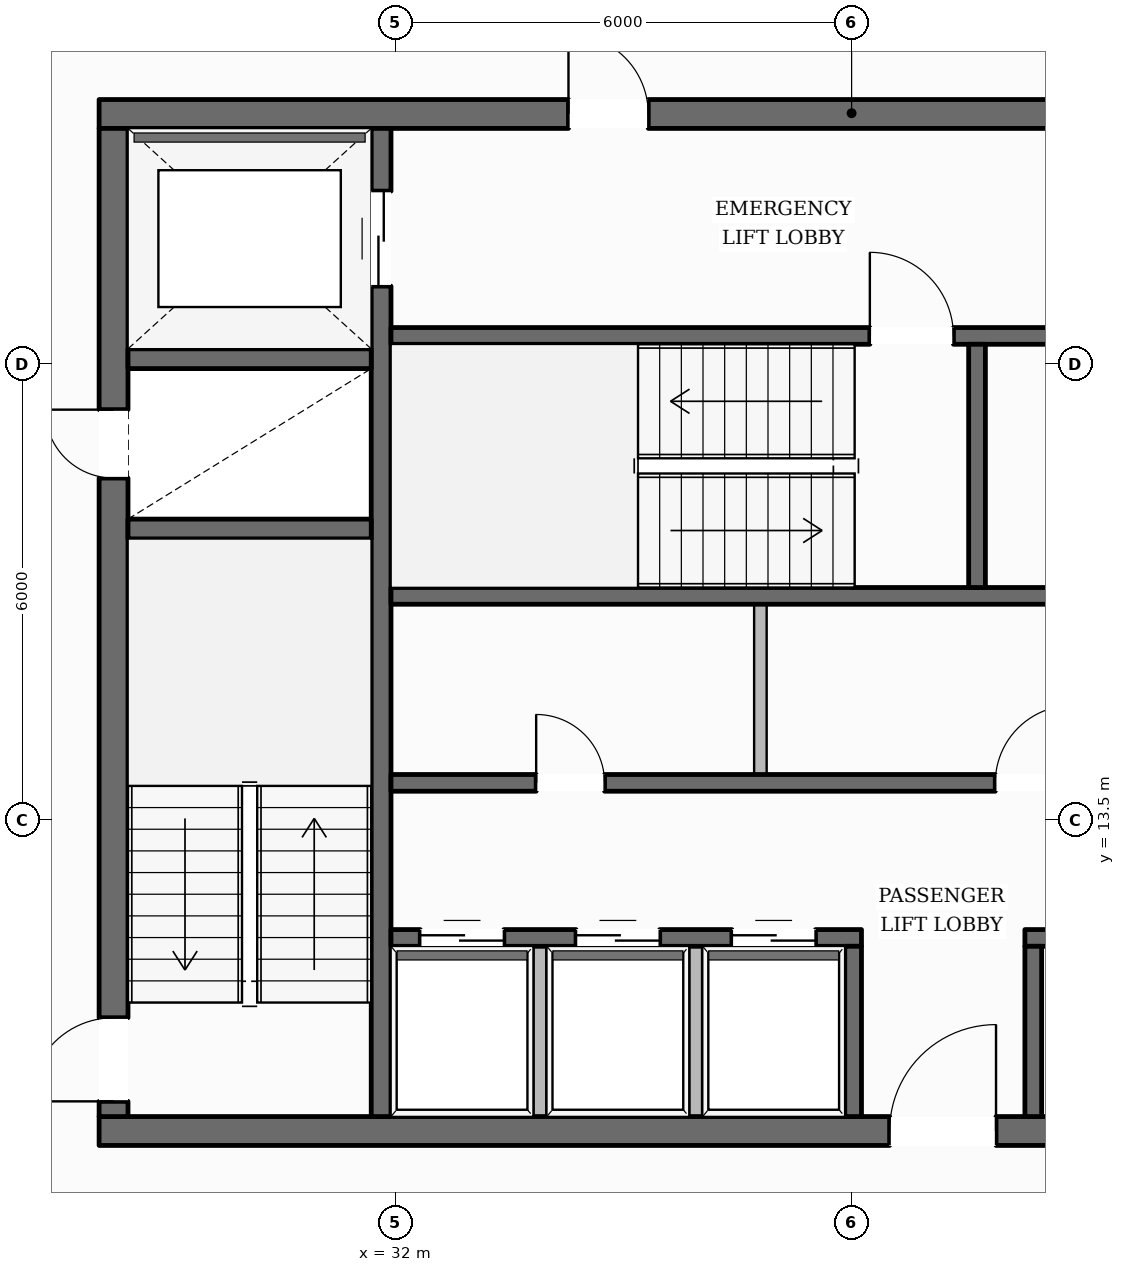
"""IFC4 building model, lengths in metres.
Left out: names, types, materials, properties, quantities, classifications, styles, units other than length and angle.
Written with IfcOpenShell. Run it as: python <this file> out.ifc"""

import sys

from ifc_helpers import new_model, si_unit, direction, frame, frame_2d, origin, place, context, subcontext, project, spatial, rectangle, extrude, element, fill, save


model = new_model("IFC4")
c1 = context("Model", 3, precision=1e-05, world=origin(), true_north=direction((0.0, 1.0)))
c2 = subcontext(c1, "Body", "Model", "MODEL_VIEW")
j1 = project(units=[si_unit("LENGTHUNIT", "METRE"), si_unit("PLANEANGLEUNIT", "RADIAN")], contexts=[c1])
p1 = place(None, origin())
s1 = spatial("IfcSite", under=j1, at=p1, CompositionType="ELEMENT")
p2 = place(p1, origin())
s2 = spatial("IfcBuilding", under=s1, at=p2, CompositionType="ELEMENT")
p3 = place(p2, frame((0.0, 0.0, 251.05)))
s3 = spatial("IfcBuildingStorey", under=s2, at=p3, CompositionType="ELEMENT", Elevation=251.05)
p4 = place(p3, frame((28.1, 9.41, 0.0), z_axis=(0.0, 0.0, 1.0), x_axis=(1.0, 0.0, 0.0)))
e1 = element("IfcWall", 1, at=p4, inside=s3, PredefinedType="SOLIDWALL", context=c2, shape_type="SweptSolid", body=[
    extrude(rectangle(XDim=19.8, YDim=0.38, at=frame_2d((9.9, 0.0))), origin(), (0.0, 0.0, 1.0), 3.61),
])
p5 = place(p4, frame((10.4, 0.0, 0.0)))
e2 = element("IfcOpeningElement", 2, at=p5, cuts=e1, PredefinedType="OPENING", context=c2, shape_type="SweptSolid", body=[
    extrude(rectangle(XDim=1.4, YDim=2.2, at=frame_2d((0.7, 1.1))), frame((0.0, 0.2, 0.0), z_axis=(0.0, -1.0, 0.0), x_axis=(1.0, 0.0, 0.0)), (0.0, 0.0, 1.0), 0.4),
])
p6 = place(p3, frame((28.1, 22.79, 0.0), z_axis=(0.0, 0.0, 1.0), x_axis=(1.0, 0.0, 0.0)))
e3 = element("IfcWall", 3, at=p6, inside=s3, PredefinedType="SOLIDWALL", context=c2, shape_type="SweptSolid", body=[
    extrude(rectangle(XDim=19.8, YDim=0.38, at=frame_2d((9.9, 0.0))), origin(), (0.0, 0.0, 1.0), 3.61),
])
p7 = place(p6, frame((6.175, 0.0, 0.0)))
e4 = element("IfcOpeningElement", 4, at=p7, cuts=e3, PredefinedType="OPENING", context=c2, shape_type="SweptSolid", body=[
    extrude(rectangle(XDim=1.05, YDim=2.15, at=frame_2d((0.525, 1.075))), frame((0.0, 0.2, 0.0), z_axis=(0.0, -1.0, 0.0), x_axis=(1.0, 0.0, 0.0)), (0.0, 0.0, 1.0), 0.4),
])
p8 = place(p6, frame((12.575, 0.0, 0.0)))
e5 = element("IfcOpeningElement", 5, at=p8, cuts=e3, PredefinedType="OPENING", context=c2, shape_type="SweptSolid", body=[
    extrude(rectangle(XDim=1.05, YDim=2.15, at=frame_2d((0.525, 1.075))), frame((0.0, 0.2, 0.0), z_axis=(0.0, -1.0, 0.0), x_axis=(1.0, 0.0, 0.0)), (0.0, 0.0, 1.0), 0.4),
])
p9 = place(p3, frame((28.29, 9.6, 0.0), z_axis=(0.0, 0.0, 1.0), x_axis=(0.0, 1.0, 0.0)))
e6 = element("IfcWall", 6, at=p9, inside=s3, PredefinedType="SOLIDWALL", context=c2, shape_type="SweptSolid", body=[
    extrude(rectangle(XDim=13.0, YDim=0.38, at=frame_2d((6.5, 0.0))), origin(), (0.0, 0.0, 1.0), 3.61),
])
p10 = place(p9, frame((0.2, 0.0, 0.0)))
e7 = element("IfcOpeningElement", 7, at=p10, cuts=e6, PredefinedType="OPENING", context=c2, shape_type="SweptSolid", body=[
    extrude(rectangle(XDim=1.1, YDim=2.15, at=frame_2d((0.55, 1.075))), frame((0.0, 0.2, 0.0), z_axis=(0.0, -1.0, 0.0), x_axis=(1.0, 0.0, 0.0)), (0.0, 0.0, 1.0), 0.4),
])
p11 = place(p9, frame((8.4, 0.0, 0.0)))
e8 = element("IfcOpeningElement", 8, at=p11, cuts=e6, PredefinedType="OPENING", context=c2, shape_type="SweptSolid", body=[
    extrude(rectangle(XDim=0.9, YDim=2.1, at=frame_2d((0.45, 1.05))), frame((0.0, 0.2, 0.0), z_axis=(0.0, -1.0, 0.0), x_axis=(1.0, 0.0, 0.0)), (0.0, 0.0, 1.0), 0.4),
])
p12 = place(p3, frame((31.81, 9.6, 0.0), z_axis=(0.0, 0.0, 1.0), x_axis=(0.0, 1.0, 0.0)))
e9 = element("IfcWall", 9, at=p12, inside=s3, PredefinedType="SHEAR", context=c2, shape_type="SweptSolid", body=[
    extrude(rectangle(XDim=13.0, YDim=0.26, at=frame_2d((6.5, 0.0))), origin(), (0.0, 0.0, 1.0), 3.61),
])
p13 = place(p12, frame((10.925, 0.0, 0.0)))
e10 = element("IfcOpeningElement", 10, at=p13, cuts=e9, PredefinedType="OPENING", context=c2, shape_type="SweptSolid", body=[
    extrude(rectangle(XDim=1.25, YDim=2.25, at=frame_2d((0.625, 1.125))), frame((0.0, 0.14, 0.0), z_axis=(0.0, -1.0, 0.0), x_axis=(1.0, 0.0, 0.0)), (0.0, 0.0, 1.0), 0.28),
])
for number, where, z_axis, x_axis in (
    (11, (28.48, 17.33, 0.0), (0.0, 0.0, 1.0), (1.0, 0.0, 0.0)),
    (12, (28.48, 19.57, 0.0), (0.0, 0.0, 1.0), (1.0, 0.0, 0.0)),
):
    element("IfcWall", number, at=place(p3, frame(where, z_axis=z_axis, x_axis=x_axis)), inside=s3, PredefinedType="SHEAR", context=c2, shape_type="SweptSolid", body=[
        extrude(rectangle(XDim=3.2, YDim=0.26, at=frame_2d((1.6, 0.0))), origin(), (0.0, 0.0, 1.0), 3.61),
    ])
p14 = place(p3, frame((31.94, 19.87, 0.0), z_axis=(0.0, 0.0, 1.0), x_axis=(1.0, 0.0, 0.0)))
e13 = element("IfcWall", 13, at=p14, inside=s3, PredefinedType="SOLIDWALL", context=c2, shape_type="SweptSolid", body=[
    extrude(rectangle(XDim=12.12, YDim=0.22, at=frame_2d((6.06, 0.0))), origin(), (0.0, 0.0, 1.0), 3.61),
])
p15 = place(p14, frame((6.3, 0.0, 0.0)))
e14 = element("IfcOpeningElement", 14, at=p15, cuts=e13, PredefinedType="OPENING", context=c2, shape_type="SweptSolid", body=[
    extrude(rectangle(XDim=1.1, YDim=2.15, at=frame_2d((0.55, 1.075))), frame((0.0, 0.12, 0.0), z_axis=(0.0, -1.0, 0.0), x_axis=(1.0, 0.0, 0.0)), (0.0, 0.0, 1.0), 0.24),
])
p16 = place(p14, frame((9.51, 0.0, 0.0)))
e15 = element("IfcOpeningElement", 15, at=p16, cuts=e13, PredefinedType="OPENING", context=c2, shape_type="SweptSolid", body=[
    extrude(rectangle(XDim=0.9, YDim=2.1, at=frame_2d((0.45, 1.05))), frame((0.0, 0.12, 0.0), z_axis=(0.0, -1.0, 0.0), x_axis=(1.0, 0.0, 0.0)), (0.0, 0.0, 1.0), 0.24),
])
p17 = place(p3, frame((31.94, 16.45, 0.0), z_axis=(0.0, 0.0, 1.0), x_axis=(1.0, 0.0, 0.0)))
e16 = element("IfcWall", 16, at=p17, inside=s3, PredefinedType="SOLIDWALL", context=c2, shape_type="SweptSolid", body=[
    extrude(rectangle(XDim=12.12, YDim=0.22, at=frame_2d((6.06, 0.0))), origin(), (0.0, 0.0, 1.0), 3.61),
])
p18 = place(p3, frame((39.65, 16.56, 0.0), z_axis=(0.0, 0.0, 1.0), x_axis=(0.0, 1.0, 0.0)))
e17 = element("IfcWall", 17, at=p18, inside=s3, PredefinedType="SOLIDWALL", context=c2, shape_type="SweptSolid", body=[
    extrude(rectangle(XDim=3.2, YDim=0.22, at=frame_2d((1.6, 0.0))), origin(), (0.0, 0.0, 1.0), 3.61),
])
p19 = place(p3, frame((31.94, 13.99, 0.0), z_axis=(0.0, 0.0, 1.0), x_axis=(1.0, 0.0, 0.0)))
e18 = element("IfcWall", 18, at=p19, inside=s3, PredefinedType="SOLIDWALL", context=c2, shape_type="SweptSolid", body=[
    extrude(rectangle(XDim=12.12, YDim=0.22, at=frame_2d((6.06, 0.0))), origin(), (0.0, 0.0, 1.0), 3.61),
])
p20 = place(p19, frame((1.91, 0.0, 0.0)))
e19 = element("IfcOpeningElement", 19, at=p20, cuts=e18, PredefinedType="OPENING", context=c2, shape_type="SweptSolid", body=[
    extrude(rectangle(XDim=0.9, YDim=2.1, at=frame_2d((0.45, 1.05))), frame((0.0, 0.12, 0.0), z_axis=(0.0, -1.0, 0.0), x_axis=(1.0, 0.0, 0.0)), (0.0, 0.0, 1.0), 0.24),
])
p21 = place(p19, frame((7.95, 0.0, 0.0)))
e20 = element("IfcOpeningElement", 20, at=p21, cuts=e18, PredefinedType="OPENING", context=c2, shape_type="SweptSolid", body=[
    extrude(rectangle(XDim=1.02, YDim=2.15, at=frame_2d((0.51, 1.075))), frame((0.0, 0.12, 0.0), z_axis=(0.0, -1.0, 0.0), x_axis=(1.0, 0.0, 0.0)), (0.0, 0.0, 1.0), 0.24),
])
p22 = place(p3, frame((31.94, 11.95, 0.0), z_axis=(0.0, 0.0, 1.0), x_axis=(1.0, 0.0, 0.0)))
e21 = element("IfcWall", 21, at=p22, inside=s3, PredefinedType="SOLIDWALL", context=c2, shape_type="SweptSolid", body=[
    extrude(rectangle(XDim=6.19, YDim=0.22, at=frame_2d((3.095, 0.0))), origin(), (0.0, 0.0, 1.0), 3.61),
])
p23 = place(p22, frame((0.385, 0.0, 0.0)))
e22 = element("IfcOpeningElement", 22, at=p23, cuts=e21, PredefinedType="OPENING", context=c2, shape_type="SweptSolid", body=[
    extrude(rectangle(XDim=1.1, YDim=2.2, at=frame_2d((0.55, 1.1))), frame((0.0, 0.12, 0.0), z_axis=(0.0, -1.0, 0.0), x_axis=(1.0, 0.0, 0.0)), (0.0, 0.0, 1.0), 0.24),
])
p24 = place(p22, frame((2.435, 0.0, 0.0)))
e23 = element("IfcOpeningElement", 23, at=p24, cuts=e21, PredefinedType="OPENING", context=c2, shape_type="SweptSolid", body=[
    extrude(rectangle(XDim=1.1, YDim=2.2, at=frame_2d((0.55, 1.1))), frame((0.0, 0.12, 0.0), z_axis=(0.0, -1.0, 0.0), x_axis=(1.0, 0.0, 0.0)), (0.0, 0.0, 1.0), 0.24),
])
p25 = place(p22, frame((4.485, 0.0, 0.0)))
e24 = element("IfcOpeningElement", 24, at=p25, cuts=e21, PredefinedType="OPENING", context=c2, shape_type="SweptSolid", body=[
    extrude(rectangle(XDim=1.1, YDim=2.2, at=frame_2d((0.55, 1.1))), frame((0.0, 0.12, 0.0), z_axis=(0.0, -1.0, 0.0), x_axis=(1.0, 0.0, 0.0)), (0.0, 0.0, 1.0), 0.24),
])
p26 = place(p3, frame((40.28, 11.95, 0.0), z_axis=(0.0, 0.0, 1.0), x_axis=(1.0, 0.0, 0.0)))
e25 = element("IfcWall", 25, at=p26, inside=s3, PredefinedType="SOLIDWALL", context=c2, shape_type="SweptSolid", body=[
    extrude(rectangle(XDim=3.78, YDim=0.22, at=frame_2d((1.89, 0.0))), origin(), (0.0, 0.0, 1.0), 3.61),
])
p27 = place(p26, frame((0.62, 0.0, 0.0)))
e26 = element("IfcOpeningElement", 26, at=p27, cuts=e25, PredefinedType="OPENING", context=c2, shape_type="SweptSolid", body=[
    extrude(rectangle(XDim=0.9, YDim=2.1, at=frame_2d((0.45, 1.05))), frame((0.0, 0.12, 0.0), z_axis=(0.0, -1.0, 0.0), x_axis=(1.0, 0.0, 0.0)), (0.0, 0.0, 1.0), 0.24),
])
p28 = place(p26, frame((2.47, 0.0, 0.0)))
e27 = element("IfcOpeningElement", 27, at=p28, cuts=e25, PredefinedType="OPENING", context=c2, shape_type="SweptSolid", body=[
    extrude(rectangle(XDim=0.9, YDim=2.1, at=frame_2d((0.45, 1.05))), frame((0.0, 0.12, 0.0), z_axis=(0.0, -1.0, 0.0), x_axis=(1.0, 0.0, 0.0)), (0.0, 0.0, 1.0), 0.24),
])
for number, where, z_axis, x_axis in (
    (28, (38.02, 9.6, 0.0), (0.0, 0.0, 1.0), (0.0, 1.0, 0.0)),
    (29, (40.39, 9.6, 0.0), (0.0, 0.0, 1.0), (0.0, 1.0, 0.0)),
):
    element("IfcWall", number, at=place(p3, frame(where, z_axis=z_axis, x_axis=x_axis)), inside=s3, PredefinedType="SOLIDWALL", context=c2, shape_type="SweptSolid", body=[
        extrude(rectangle(XDim=2.24, YDim=0.22, at=frame_2d((1.12, 0.0))), origin(), (0.0, 0.0, 1.0), 3.61),
    ])
p29 = place(p3, frame((16.214, 11.135, 0.0), z_axis=(0.0, 0.0, 1.0), x_axis=(0.49510347201, 0.868834018673, 0.0)))
e30 = element("IfcWall", 30, at=p29, inside=s3, PredefinedType="STANDARD", context=c2, shape_type="SweptSolid", body=[
    extrude(rectangle(XDim=37.643, YDim=0.35, at=frame_2d((18.822, 0.0))), origin(), (0.0, 0.0, 1.0), 3.196),
])
p30 = place(p29, frame((33.429, 0.0, 0.65)))
e31 = element("IfcOpeningElement", 31, at=p30, cuts=e30, PredefinedType="OPENING", context=c2, shape_type="SweptSolid", body=[
    extrude(rectangle(XDim=1.35, YDim=1.75, at=frame_2d((0.675, 0.875))), frame((0.0, 0.185, 0.0), z_axis=(0.0, -1.0, 0.0), x_axis=(1.0, 0.0, 0.0)), (0.0, 0.0, 1.0), 0.37),
])
p31 = place(p29, frame((27.315, 0.0, 0.65)))
e32 = element("IfcOpeningElement", 32, at=p31, cuts=e30, PredefinedType="OPENING", context=c2, shape_type="SweptSolid", body=[
    extrude(rectangle(XDim=1.35, YDim=1.75, at=frame_2d((0.675, 0.875))), frame((0.0, 0.185, 0.0), z_axis=(0.0, -1.0, 0.0), x_axis=(1.0, 0.0, 0.0)), (0.0, 0.0, 1.0), 0.37),
])
p32 = place(p29, frame((15.087, 0.0, 0.65)))
e33 = element("IfcOpeningElement", 33, at=p32, cuts=e30, PredefinedType="OPENING", context=c2, shape_type="SweptSolid", body=[
    extrude(rectangle(XDim=1.35, YDim=1.75, at=frame_2d((0.675, 0.875))), frame((0.0, 0.185, 0.0), z_axis=(0.0, -1.0, 0.0), x_axis=(1.0, 0.0, 0.0)), (0.0, 0.0, 1.0), 0.37),
])
p33 = place(p29, frame((8.973, 0.0, 0.65)))
e34 = element("IfcOpeningElement", 34, at=p33, cuts=e30, PredefinedType="OPENING", context=c2, shape_type="SweptSolid", body=[
    extrude(rectangle(XDim=1.35, YDim=1.75, at=frame_2d((0.675, 0.875))), frame((0.0, 0.185, 0.0), z_axis=(0.0, -1.0, 0.0), x_axis=(1.0, 0.0, 0.0)), (0.0, 0.0, 1.0), 0.37),
])
p34 = place(p29, frame((2.859, 0.0, 0.65)))
e35 = element("IfcOpeningElement", 35, at=p34, cuts=e30, PredefinedType="OPENING", context=c2, shape_type="SweptSolid", body=[
    extrude(rectangle(XDim=1.35, YDim=1.75, at=frame_2d((0.675, 0.875))), frame((0.0, 0.185, 0.0), z_axis=(0.0, -1.0, 0.0), x_axis=(1.0, 0.0, 0.0)), (0.0, 0.0, 1.0), 0.37),
])
for number, where, z_axis, x_axis in (
    (36, (33.9, 9.49, 0.0), (0.0, 0.0, 1.0), (0.0, 1.0, 0.0)),
    (37, (35.95, 9.49, 0.0), (0.0, 0.0, 1.0), (0.0, 1.0, 0.0)),
):
    element("IfcWall", number, at=place(p3, frame(where, z_axis=z_axis, x_axis=x_axis)), inside=s3, PredefinedType="PARTITIONING", context=c2, shape_type="SweptSolid", body=[
        extrude(rectangle(XDim=2.35, YDim=0.165, at=frame_2d((1.175, 0.0))), origin(), (0.0, 0.0, 1.0), 3.61),
    ])
p35 = place(p3, frame((36.8, 14.1, 0.0), z_axis=(0.0, 0.0, 1.0), x_axis=(0.0, 1.0, 0.0)))
e38 = element("IfcWall", 38, at=p35, inside=s3, PredefinedType="PARTITIONING", context=c2, shape_type="SweptSolid", body=[
    extrude(rectangle(XDim=2.24, YDim=0.165, at=frame_2d((1.12, 0.0))), origin(), (0.0, 0.0, 1.0), 3.61),
])
p36 = place(p10, origin())
e39 = element("IfcDoor", 39, at=p36, inside=s3, OperationType="SINGLE_SWING_LEFT", PredefinedType="DOOR", context=c2, shape_type="SweptSolid", body=[
    extrude(rectangle(XDim=1.1, YDim=2.15, at=frame_2d((0.55, 1.075))), frame((0.0, 0.025, 0.0), z_axis=(0.0, -1.0, 0.0), x_axis=(1.0, 0.0, 0.0)), (0.0, 0.0, 1.0), 0.05),
])
fill(e7, e39)
p37 = place(p15, origin())
e40 = element("IfcDoor", 40, at=p37, inside=s3, OperationType="SINGLE_SWING_LEFT", PredefinedType="DOOR", context=c2, shape_type="SweptSolid", body=[
    extrude(rectangle(XDim=1.1, YDim=2.15, at=frame_2d((0.55, 1.075))), frame((0.0, 0.025, 0.0), z_axis=(0.0, -1.0, 0.0), x_axis=(1.0, 0.0, 0.0)), (0.0, 0.0, 1.0), 0.05),
])
fill(e14, e40)
p38 = place(p11, origin())
e41 = element("IfcDoor", 41, at=p38, inside=s3, OperationType="SINGLE_SWING_RIGHT", PredefinedType="DOOR", context=c2, shape_type="SweptSolid", body=[
    extrude(rectangle(XDim=0.9, YDim=2.1, at=frame_2d((0.45, 1.05))), frame((0.0, 0.025, 0.0), z_axis=(0.0, -1.0, 0.0), x_axis=(1.0, 0.0, 0.0)), (0.0, 0.0, 1.0), 0.05),
])
fill(e8, e41)
p39 = place(p7, origin())
e42 = element("IfcDoor", 42, at=p39, inside=s3, OperationType="SINGLE_SWING_LEFT", PredefinedType="DOOR", context=c2, shape_type="SweptSolid", body=[
    extrude(rectangle(XDim=1.05, YDim=2.15, at=frame_2d((0.525, 1.075))), frame((0.0, 0.025, 0.0), z_axis=(0.0, -1.0, 0.0), x_axis=(1.0, 0.0, 0.0)), (0.0, 0.0, 1.0), 0.05),
])
fill(e4, e42)
p40 = place(p13, origin())
e43 = element("IfcDoor", 43, at=p40, inside=s3, OperationType="DOUBLE_DOOR_SLIDING", PredefinedType="DOOR", context=c2, shape_type="SweptSolid", body=[
    extrude(rectangle(XDim=1.25, YDim=2.25, at=frame_2d((0.625, 1.125))), frame((0.0, 0.025, 0.0), z_axis=(0.0, -1.0, 0.0), x_axis=(1.0, 0.0, 0.0)), (0.0, 0.0, 1.0), 0.05),
])
fill(e10, e43)
p41 = place(p5, origin())
e44 = element("IfcDoor", 44, at=p41, inside=s3, OperationType="SINGLE_SWING_RIGHT", PredefinedType="DOOR", context=c2, shape_type="SweptSolid", body=[
    extrude(rectangle(XDim=1.4, YDim=2.2, at=frame_2d((0.7, 1.1))), frame((0.0, 0.025, 0.0), z_axis=(0.0, -1.0, 0.0), x_axis=(1.0, 0.0, 0.0)), (0.0, 0.0, 1.0), 0.05),
])
fill(e2, e44)
p42 = place(p23, origin())
e45 = element("IfcDoor", 45, at=p42, inside=s3, OperationType="DOUBLE_DOOR_SLIDING", PredefinedType="DOOR", context=c2, shape_type="SweptSolid", body=[
    extrude(rectangle(XDim=1.1, YDim=2.2, at=frame_2d((0.55, 1.1))), frame((0.0, 0.025, 0.0), z_axis=(0.0, -1.0, 0.0), x_axis=(1.0, 0.0, 0.0)), (0.0, 0.0, 1.0), 0.05),
])
fill(e22, e45)
p43 = place(p24, origin())
e46 = element("IfcDoor", 46, at=p43, inside=s3, OperationType="DOUBLE_DOOR_SLIDING", PredefinedType="DOOR", context=c2, shape_type="SweptSolid", body=[
    extrude(rectangle(XDim=1.1, YDim=2.2, at=frame_2d((0.55, 1.1))), frame((0.0, 0.025, 0.0), z_axis=(0.0, -1.0, 0.0), x_axis=(1.0, 0.0, 0.0)), (0.0, 0.0, 1.0), 0.05),
])
fill(e23, e46)
p44 = place(p25, origin())
e47 = element("IfcDoor", 47, at=p44, inside=s3, OperationType="DOUBLE_DOOR_SLIDING", PredefinedType="DOOR", context=c2, shape_type="SweptSolid", body=[
    extrude(rectangle(XDim=1.1, YDim=2.2, at=frame_2d((0.55, 1.1))), frame((0.0, 0.025, 0.0), z_axis=(0.0, -1.0, 0.0), x_axis=(1.0, 0.0, 0.0)), (0.0, 0.0, 1.0), 0.05),
])
fill(e24, e47)
p45 = place(p20, origin())
e48 = element("IfcDoor", 48, at=p45, inside=s3, OperationType="SINGLE_SWING_LEFT", PredefinedType="DOOR", context=c2, shape_type="SweptSolid", body=[
    extrude(rectangle(XDim=0.9, YDim=2.1, at=frame_2d((0.45, 1.05))), frame((0.0, 0.025, 0.0), z_axis=(0.0, -1.0, 0.0), x_axis=(1.0, 0.0, 0.0)), (0.0, 0.0, 1.0), 0.05),
])
fill(e19, e48)
p46 = place(p21, origin())
e49 = element("IfcDoor", 49, at=p46, inside=s3, OperationType="SINGLE_SWING_RIGHT", PredefinedType="DOOR", context=c2, shape_type="SweptSolid", body=[
    extrude(rectangle(XDim=1.02, YDim=2.15, at=frame_2d((0.51, 1.075))), frame((0.0, 0.025, 0.0), z_axis=(0.0, -1.0, 0.0), x_axis=(1.0, 0.0, 0.0)), (0.0, 0.0, 1.0), 0.05),
])
fill(e20, e49)
save(model, sys.argv[1])
